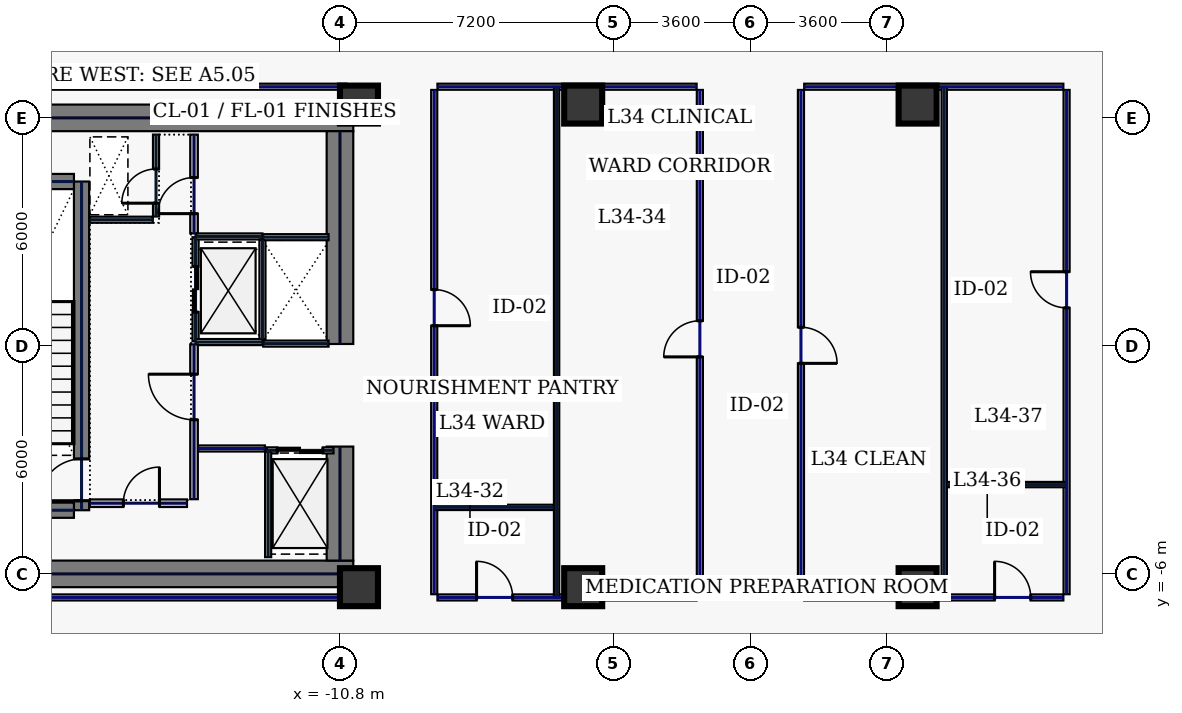
"""IFC4 building model, lengths in metres.
Left out: names, types, materials, properties, quantities, classifications, styles, units other than length and angle.
Written with IfcOpenShell. Run it as: python <this file> out.ifc"""

import sys

from ifc_helpers import new_model, si_unit, direction, frame, frame_2d, origin, origin_2d, place, context, subcontext, project, spatial, rectangle, hollow_rectangle, extrude, element, fill, save


model = new_model("IFC4")
c1 = context("Model", 3, precision=1e-05, world=origin(), true_north=direction((0.0, 1.0)))
c2 = subcontext(c1, "Body", "Model", "MODEL_VIEW")
j1 = project(units=[si_unit("LENGTHUNIT", "METRE"), si_unit("PLANEANGLEUNIT", "RADIAN")], contexts=[c1])
p1 = place(None, origin())
s1 = spatial("IfcSite", under=j1, at=p1, CompositionType="ELEMENT")
p2 = place(p1, origin())
s2 = spatial("IfcBuilding", under=s1, at=p2, CompositionType="ELEMENT")
p3 = place(p2, frame((0.0, 0.0, 152.2)))
s3 = spatial("IfcBuildingStorey", under=s2, at=p3, CompositionType="ELEMENT", Elevation=152.2)
for number, where, z_axis, x_axis in (
    (1, (-22.0, 6.0, 0.0), (0.0, 0.0, 1.0), (1.0, 0.0, 0.0)),
    (2, (-22.0, -6.0, 0.0), (0.0, 0.0, 1.0), (1.0, 0.0, 0.0)),
):
    element("IfcWall", number, at=place(p3, frame(where, z_axis=z_axis, x_axis=x_axis)), inside=s3, PredefinedType="SHEAR", context=c2, shape_type="SweptSolid", body=[
        extrude(rectangle(XDim=11.55, YDim=0.7, at=frame_2d((5.775, 0.0))), origin(), (0.0, 0.0, 1.0), 3.74),
    ])
p4 = place(p3, frame((-10.8, -5.65, 0.0), z_axis=(0.0, 0.0, 1.0), x_axis=(0.0, 1.0, 0.0)))
e3 = element("IfcWall", 3, at=p4, inside=s3, PredefinedType="SHEAR", context=c2, shape_type="SweptSolid", body=[
    extrude(rectangle(XDim=3.0, YDim=0.7, at=frame_2d((1.5, 0.0))), origin(), (0.0, 0.0, 1.0), 3.74),
])
p5 = place(p3, frame((-10.8, 0.05, 0.0), z_axis=(0.0, 0.0, 1.0), x_axis=(0.0, 1.0, 0.0)))
e4 = element("IfcWall", 4, at=p5, inside=s3, PredefinedType="SHEAR", context=c2, shape_type="SweptSolid", body=[
    extrude(rectangle(XDim=5.6, YDim=0.7, at=frame_2d((2.8, 0.0))), origin(), (0.0, 0.0, 1.0), 3.74),
])
p6 = place(p3, frame((-17.6, -4.325, 0.0), z_axis=(0.0, 0.0, 1.0), x_axis=(0.0, 1.0, 0.0)))
e5 = element("IfcWall", 5, at=p6, inside=s3, PredefinedType="SHEAR", context=c2, shape_type="SweptSolid", body=[
    extrude(rectangle(XDim=8.65, YDim=0.4, at=frame_2d((4.325, 0.0))), origin(), (0.0, 0.0, 1.0), 3.74),
])
p7 = place(p6, frame((0.25, 0.0, 0.0)))
e6 = element("IfcOpeningElement", 6, at=p7, cuts=e5, PredefinedType="OPENING", context=c2, shape_type="SweptSolid", body=[
    extrude(rectangle(XDim=1.1, YDim=2.2, at=frame_2d((0.55, 1.1))), frame((0.0, 0.21, 0.0), z_axis=(0.0, -1.0, 0.0), x_axis=(1.0, 0.0, 0.0)), (0.0, 0.0, 1.0), 0.42),
])
for number, where, z_axis, x_axis in (
    (7, (-21.2, -4.325, 0.0), (0.0, 0.0, 1.0), (1.0, 0.0, 0.0)),
    (8, (-21.2, 4.325, 0.0), (0.0, 0.0, 1.0), (1.0, 0.0, 0.0)),
):
    element("IfcWall", number, at=place(p3, frame(where, z_axis=z_axis, x_axis=x_axis)), inside=s3, PredefinedType="SHEAR", context=c2, shape_type="SweptSolid", body=[
        extrude(rectangle(XDim=3.4, YDim=0.4, at=frame_2d((1.7, 0.0))), origin(), (0.0, 0.0, 1.0), 3.74),
    ])
for number, where, z_axis, x_axis in (
    (9, (-10.3, -6.35, 0.0), (0.0, 0.0, 1.0), (1.0, 0.0, 0.0)),
    (10, (-10.3, 6.35, 0.0), (0.0, 0.0, 1.0), (1.0, 0.0, 0.0)),
    (11, (-4.4, -6.35, 0.0), (0.0, 0.0, 1.0), (1.0, 0.0, 0.0)),
    (12, (4.4, -6.35, 0.0), (0.0, 0.0, 1.0), (1.0, 0.0, 0.0)),
    (13, (-4.4, 6.35, 0.0), (0.0, 0.0, 1.0), (1.0, 0.0, 0.0)),
    (14, (4.4, 6.35, 0.0), (0.0, 0.0, 1.0), (1.0, 0.0, 0.0)),
):
    element("IfcColumn", number, at=place(p3, frame(where, z_axis=z_axis, x_axis=x_axis)), inside=s3, PredefinedType="COLUMN", context=c2, shape_type="SweptSolid", body=[
        extrude(hollow_rectangle(XDim=1.0, YDim=1.0, WallThickness=0.045, at=origin_2d()), origin(), (0.0, 0.0, 1.0), 3.74),
    ])
p8 = place(p3, frame((-14.6, 0.12, 0.0), z_axis=(0.0, 0.0, 1.0), x_axis=(0.0, 1.0, 0.0)))
e15 = element("IfcWall", 15, at=p8, inside=s3, PredefinedType="PARTITIONING", context=c2, shape_type="SweptSolid", body=[
    extrude(rectangle(XDim=2.74, YDim=0.16, at=frame_2d((1.37, 0.0))), origin(), (0.0, 0.0, 1.0), 3.74),
])
p9 = place(p8, frame((0.77, 0.0, 0.0)))
e16 = element("IfcOpeningElement", 16, at=p9, cuts=e15, PredefinedType="OPENING", context=c2, shape_type="SweptSolid", body=[
    extrude(rectangle(XDim=1.2, YDim=2.2, at=frame_2d((0.6, 1.1))), frame((0.0, 0.09, 0.0), z_axis=(0.0, -1.0, 0.0), x_axis=(1.0, 0.0, 0.0)), (0.0, 0.0, 1.0), 0.18),
])
for number, where, z_axis, x_axis in (
    (17, (-14.6, 0.1, 0.0), (0.0, 0.0, 1.0), (1.0, 0.0, 0.0)),
    (18, (-14.6, 2.88, 0.0), (0.0, 0.0, 1.0), (1.0, 0.0, 0.0)),
):
    element("IfcWall", number, at=place(p3, frame(where, z_axis=z_axis, x_axis=x_axis)), inside=s3, PredefinedType="PARTITIONING", context=c2, shape_type="SweptSolid", body=[
        extrude(rectangle(XDim=1.76, YDim=0.16, at=frame_2d((0.88, 0.0))), origin(), (0.0, 0.0, 1.0), 3.74),
    ])
p10 = place(p3, frame((-12.84, 0.18, 0.0), z_axis=(0.0, 0.0, 1.0), x_axis=(0.0, 1.0, 0.0)))
e19 = element("IfcWall", 19, at=p10, inside=s3, PredefinedType="PARTITIONING", context=c2, shape_type="SweptSolid", body=[
    extrude(rectangle(XDim=2.62, YDim=0.16, at=frame_2d((1.31, 0.0))), origin(), (0.0, 0.0, 1.0), 3.74),
])
p11 = place(p3, frame((-12.73, -2.75, 0.0), z_axis=(0.0, 0.0, 1.0), x_axis=(1.0, 0.0, 0.0)))
e20 = element("IfcWall", 20, at=p11, inside=s3, PredefinedType="PARTITIONING", context=c2, shape_type="SweptSolid", body=[
    extrude(rectangle(XDim=1.76, YDim=0.16, at=frame_2d((0.88, 0.0))), origin(), (0.0, 0.0, 1.0), 3.74),
])
p12 = place(p11, frame((0.28, 0.0, 0.0)))
e21 = element("IfcOpeningElement", 21, at=p12, cuts=e20, PredefinedType="OPENING", context=c2, shape_type="SweptSolid", body=[
    extrude(rectangle(XDim=1.2, YDim=2.2, at=frame_2d((0.6, 1.1))), frame((0.0, 0.09, 0.0), z_axis=(0.0, -1.0, 0.0), x_axis=(1.0, 0.0, 0.0)), (0.0, 0.0, 1.0), 0.18),
])
for number, where, z_axis, x_axis in (
    (22, (-12.82, 0.06, 0.0), (0.0, 0.0, 1.0), (1.0, 0.0, 0.0)),
    (23, (-12.82, 2.86, 0.0), (0.0, 0.0, 1.0), (1.0, 0.0, 0.0)),
):
    element("IfcWall", number, at=place(p3, frame(where, z_axis=z_axis, x_axis=x_axis)), inside=s3, PredefinedType="PARTITIONING", context=c2, shape_type="SweptSolid", body=[
        extrude(rectangle(XDim=1.72, YDim=0.16, at=frame_2d((0.86, 0.0))), origin(), (0.0, 0.0, 1.0), 3.74),
    ])
p13 = place(p3, frame((-15.64, 3.405, 0.0), z_axis=(0.0, 0.0, 1.0), x_axis=(0.0, 1.0, 0.0)))
e24 = element("IfcWall", 24, at=p13, inside=s3, PredefinedType="PARTITIONING", context=c2, shape_type="SweptSolid", body=[
    extrude(rectangle(XDim=2.155, YDim=0.16, at=frame_2d((1.078, 0.0))), origin(), (0.0, 0.0, 1.0), 3.74),
])
p14 = place(p13, frame((0.35, 0.0, 0.0)))
e25 = element("IfcOpeningElement", 25, at=p14, cuts=e24, PredefinedType="OPENING", context=c2, shape_type="SweptSolid", body=[
    extrude(rectangle(XDim=0.9, YDim=2.2, at=frame_2d((0.45, 1.1))), frame((0.0, 0.09, 0.0), z_axis=(0.0, -1.0, 0.0), x_axis=(1.0, 0.0, 0.0)), (0.0, 0.0, 1.0), 0.18),
])
p15 = place(p3, frame((-17.38, 3.32, 0.0), z_axis=(0.0, 0.0, 1.0), x_axis=(1.0, 0.0, 0.0)))
e26 = element("IfcWall", 26, at=p15, inside=s3, PredefinedType="PARTITIONING", context=c2, shape_type="SweptSolid", body=[
    extrude(rectangle(XDim=1.655, YDim=0.16, at=frame_2d((0.827, 0.0))), origin(), (0.0, 0.0, 1.0), 3.74),
])
p16 = place(p3, frame((-17.38, -4.14, 0.0), z_axis=(0.0, 0.0, 1.0), x_axis=(1.0, 0.0, 0.0)))
e27 = element("IfcWall", 27, at=p16, inside=s3, PredefinedType="SOLIDWALL", context=c2, shape_type="SweptSolid", body=[
    extrude(rectangle(XDim=2.555, YDim=0.2, at=frame_2d((1.277, 0.0))), origin(), (0.0, 0.0, 1.0), 3.74),
])
p17 = place(p16, frame((0.88, 0.0, 0.0)))
e28 = element("IfcOpeningElement", 28, at=p17, cuts=e27, PredefinedType="OPENING", context=c2, shape_type="SweptSolid", body=[
    extrude(rectangle(XDim=0.95, YDim=2.2, at=frame_2d((0.475, 1.1))), frame((0.0, 0.11, 0.0), z_axis=(0.0, -1.0, 0.0), x_axis=(1.0, 0.0, 0.0)), (0.0, 0.0, 1.0), 0.22),
])
p18 = place(p3, frame((-14.535, -2.7, 0.0), z_axis=(0.0, 0.0, 1.0), x_axis=(1.0, 0.0, 0.0)))
e29 = element("IfcWall", 29, at=p18, inside=s3, PredefinedType="PARTITIONING", context=c2, shape_type="SweptSolid", body=[
    extrude(rectangle(XDim=1.76, YDim=0.16, at=frame_2d((0.88, 0.0))), origin(), (0.0, 0.0, 1.0), 3.74),
])
p19 = place(p3, frame((-12.69, -5.56, 0.0), z_axis=(0.0, 0.0, 1.0), x_axis=(0.0, 1.0, 0.0)))
e30 = element("IfcWall", 30, at=p19, inside=s3, PredefinedType="PARTITIONING", context=c2, shape_type="SweptSolid", body=[
    extrude(rectangle(XDim=2.775, YDim=0.16, at=frame_2d((1.388, 0.0))), origin(), (0.0, 0.0, 1.0), 3.74),
])
p20 = place(p3, frame((-14.64, 2.96, 0.0), z_axis=(0.0, 0.0, 1.0), x_axis=(0.0, 1.0, 0.0)))
e31 = element("IfcWall", 31, at=p20, inside=s3, PredefinedType="SOLIDWALL", context=c2, shape_type="SweptSolid", body=[
    extrude(rectangle(XDim=2.6, YDim=0.2, at=frame_2d((1.3, 0.0))), origin(), (0.0, 0.0, 1.0), 3.74),
])
p21 = place(p20, frame((0.52, 0.0, 0.0)))
e32 = element("IfcOpeningElement", 32, at=p21, cuts=e31, PredefinedType="OPENING", context=c2, shape_type="SweptSolid", body=[
    extrude(rectangle(XDim=0.95, YDim=2.2, at=frame_2d((0.475, 1.1))), frame((0.0, 0.11, 0.0), z_axis=(0.0, -1.0, 0.0), x_axis=(1.0, 0.0, 0.0)), (0.0, 0.0, 1.0), 0.22),
])
p22 = place(p3, frame((-14.64, -4.035, 0.0), z_axis=(0.0, 0.0, 1.0), x_axis=(0.0, 1.0, 0.0)))
e33 = element("IfcWall", 33, at=p22, inside=s3, PredefinedType="SOLIDWALL", context=c2, shape_type="SweptSolid", body=[
    extrude(rectangle(XDim=4.075, YDim=0.2, at=frame_2d((2.038, 0.0))), origin(), (0.0, 0.0, 1.0), 3.74),
])
p23 = place(p22, frame((2.09, 0.0, 0.0)))
e34 = element("IfcOpeningElement", 34, at=p23, cuts=e33, PredefinedType="OPENING", context=c2, shape_type="SweptSolid", body=[
    extrude(rectangle(XDim=1.2, YDim=2.2, at=frame_2d((0.6, 1.1))), frame((0.0, 0.11, 0.0), z_axis=(0.0, -1.0, 0.0), x_axis=(1.0, 0.0, 0.0)), (0.0, 0.0, 1.0), 0.22),
])
for number, where, z_axis, x_axis in (
    (35, (-24.965, -6.62, 0.0), (0.0, 0.0, 1.0), (1.0, 0.0, 0.0)),
    (36, (-10.63, 6.82, 0.0), (0.0, 0.0, 1.0), (-1.0, 0.0, 0.0)),
):
    element("IfcWall", number, at=place(p3, frame(where, z_axis=z_axis, x_axis=x_axis)), inside=s3, PredefinedType="PARTITIONING", context=c2, shape_type="SweptSolid", body=[
        extrude(rectangle(XDim=14.335, YDim=0.16, at=frame_2d((7.167, 0.0))), origin(), (0.0, 0.0, 1.0), 3.74),
    ])
p24 = place(p3, frame((8.235, 6.82, 0.0), z_axis=(0.0, 0.0, 1.0), x_axis=(-1.0, 0.0, 0.0)))
e37 = element("IfcWall", 37, at=p24, inside=s3, PredefinedType="PARTITIONING", context=c2, shape_type="SweptSolid", body=[
    extrude(rectangle(XDim=6.82, YDim=0.16, at=frame_2d((3.41, 0.0))), origin(), (0.0, 0.0, 1.0), 3.74),
])
p25 = place(p3, frame((1.33, 6.735, 0.0), z_axis=(0.0, 0.0, 1.0), x_axis=(0.0, -1.0, 0.0)))
e38 = element("IfcWall", 38, at=p25, inside=s3, PredefinedType="PARTITIONING", context=c2, shape_type="SweptSolid", body=[
    extrude(rectangle(XDim=13.27, YDim=0.16, at=frame_2d((6.635, 0.0))), origin(), (0.0, 0.0, 1.0), 3.74),
])
p26 = place(p25, frame((6.245, 0.0, 0.0)))
e39 = element("IfcOpeningElement", 39, at=p26, cuts=e38, PredefinedType="OPENING", context=c2, shape_type="SweptSolid", body=[
    extrude(rectangle(XDim=0.95, YDim=2.2, at=frame_2d((0.475, 1.1))), frame((0.0, 0.09, 0.0), z_axis=(0.0, -1.0, 0.0), x_axis=(1.0, 0.0, 0.0)), (0.0, 0.0, 1.0), 0.18),
])
p27 = place(p3, frame((1.415, -6.62, 0.0), z_axis=(0.0, 0.0, 1.0), x_axis=(1.0, 0.0, 0.0)))
e40 = element("IfcWall", 40, at=p27, inside=s3, PredefinedType="PARTITIONING", context=c2, shape_type="SweptSolid", body=[
    extrude(rectangle(XDim=6.82, YDim=0.16, at=frame_2d((3.41, 0.0))), origin(), (0.0, 0.0, 1.0), 3.74),
])
p28 = place(p27, frame((5.011, 0.0, 0.0)))
e41 = element("IfcOpeningElement", 41, at=p28, cuts=e40, PredefinedType="OPENING", context=c2, shape_type="SweptSolid", body=[
    extrude(rectangle(XDim=0.95, YDim=2.2, at=frame_2d((0.475, 1.1))), frame((0.0, 0.09, 0.0), z_axis=(0.0, -1.0, 0.0), x_axis=(1.0, 0.0, 0.0)), (0.0, 0.0, 1.0), 0.18),
])
p29 = place(p3, frame((8.32, -6.535, 0.0), z_axis=(0.0, 0.0, 1.0), x_axis=(0.0, 1.0, 0.0)))
e42 = element("IfcWall", 42, at=p29, inside=s3, PredefinedType="PARTITIONING", context=c2, shape_type="SweptSolid", body=[
    extrude(rectangle(XDim=13.27, YDim=0.16, at=frame_2d((6.635, 0.0))), origin(), (0.0, 0.0, 1.0), 3.74),
])
p30 = place(p29, frame((7.536, 0.0, 0.0)))
e43 = element("IfcOpeningElement", 43, at=p30, cuts=e42, PredefinedType="OPENING", context=c2, shape_type="SweptSolid", body=[
    extrude(rectangle(XDim=0.95, YDim=2.2, at=frame_2d((0.475, 1.1))), frame((0.0, 0.09, 0.0), z_axis=(0.0, -1.0, 0.0), x_axis=(1.0, 0.0, 0.0)), (0.0, 0.0, 1.0), 0.18),
])
p31 = place(p3, frame((-1.33, -6.535, 0.0), z_axis=(0.0, 0.0, 1.0), x_axis=(0.0, 1.0, 0.0)))
e44 = element("IfcWall", 44, at=p31, inside=s3, PredefinedType="PARTITIONING", context=c2, shape_type="SweptSolid", body=[
    extrude(rectangle(XDim=13.27, YDim=0.16, at=frame_2d((6.635, 0.0))), origin(), (0.0, 0.0, 1.0), 3.74),
])
p32 = place(p31, frame((6.245, 0.0, 0.0)))
e45 = element("IfcOpeningElement", 45, at=p32, cuts=e44, PredefinedType="OPENING", context=c2, shape_type="SweptSolid", body=[
    extrude(rectangle(XDim=0.95, YDim=2.2, at=frame_2d((0.475, 1.1))), frame((0.0, 0.09, 0.0), z_axis=(0.0, -1.0, 0.0), x_axis=(1.0, 0.0, 0.0)), (0.0, 0.0, 1.0), 0.18),
])
p33 = place(p3, frame((-1.415, 6.82, 0.0), z_axis=(0.0, 0.0, 1.0), x_axis=(-1.0, 0.0, 0.0)))
e46 = element("IfcWall", 46, at=p33, inside=s3, PredefinedType="PARTITIONING", context=c2, shape_type="SweptSolid", body=[
    extrude(rectangle(XDim=6.82, YDim=0.16, at=frame_2d((3.41, 0.0))), origin(), (0.0, 0.0, 1.0), 3.74),
])
p34 = place(p3, frame((-8.32, 6.735, 0.0), z_axis=(0.0, 0.0, 1.0), x_axis=(0.0, -1.0, 0.0)))
e47 = element("IfcWall", 47, at=p34, inside=s3, PredefinedType="PARTITIONING", context=c2, shape_type="SweptSolid", body=[
    extrude(rectangle(XDim=13.27, YDim=0.16, at=frame_2d((6.635, 0.0))), origin(), (0.0, 0.0, 1.0), 3.74),
])
p35 = place(p34, frame((5.254, 0.0, 0.0)))
e48 = element("IfcOpeningElement", 48, at=p35, cuts=e47, PredefinedType="OPENING", context=c2, shape_type="SweptSolid", body=[
    extrude(rectangle(XDim=0.95, YDim=2.2, at=frame_2d((0.475, 1.1))), frame((0.0, 0.09, 0.0), z_axis=(0.0, -1.0, 0.0), x_axis=(1.0, 0.0, 0.0)), (0.0, 0.0, 1.0), 0.18),
])
p36 = place(p3, frame((-8.235, -6.62, 0.0), z_axis=(0.0, 0.0, 1.0), x_axis=(1.0, 0.0, 0.0)))
e49 = element("IfcWall", 49, at=p36, inside=s3, PredefinedType="PARTITIONING", context=c2, shape_type="SweptSolid", body=[
    extrude(rectangle(XDim=6.82, YDim=0.16, at=frame_2d((3.41, 0.0))), origin(), (0.0, 0.0, 1.0), 3.74),
])
p37 = place(p36, frame((1.029, 0.0, 0.0)))
e50 = element("IfcOpeningElement", 50, at=p37, cuts=e49, PredefinedType="OPENING", context=c2, shape_type="SweptSolid", body=[
    extrude(rectangle(XDim=0.95, YDim=2.2, at=frame_2d((0.475, 1.1))), frame((0.0, 0.09, 0.0), z_axis=(0.0, -1.0, 0.0), x_axis=(1.0, 0.0, 0.0)), (0.0, 0.0, 1.0), 0.18),
])
for number, where, z_axis, x_axis in (
    (51, (-5.1, -6.615, 0.0), (0.0, 0.0, 1.0), (0.0, 1.0, 0.0)),
    (52, (5.1, -6.615, 0.0), (0.0, 0.0, 1.0), (0.0, 1.0, 0.0)),
):
    element("IfcWall", number, at=place(p3, frame(where, z_axis=z_axis, x_axis=x_axis)), inside=s3, PredefinedType="PARTITIONING", context=c2, shape_type="SweptSolid", body=[
        extrude(rectangle(XDim=13.43, YDim=0.14, at=frame_2d((6.715, 0.0))), origin(), (0.0, 0.0, 1.0), 3.74),
    ])
for number, where, z_axis, x_axis in (
    (53, (-8.315, -4.25, 0.0), (0.0, 0.0, 1.0), (1.0, 0.0, 0.0)),
    (54, (5.175, -3.65, 0.0), (0.0, 0.0, 1.0), (1.0, 0.0, 0.0)),
):
    element("IfcWall", number, at=place(p3, frame(where, z_axis=z_axis, x_axis=x_axis)), inside=s3, PredefinedType="PARTITIONING", context=c2, shape_type="SweptSolid", body=[
        extrude(rectangle(XDim=3.14, YDim=0.14, at=frame_2d((1.57, 0.0))), origin(), (0.0, 0.0, 1.0), 3.74),
    ])
p38 = place(p7, origin())
e55 = element("IfcDoor", 55, at=p38, inside=s3, OperationType="SINGLE_SWING_LEFT", PredefinedType="DOOR", context=c2, shape_type="SweptSolid", body=[
    extrude(rectangle(XDim=1.1, YDim=2.2, at=frame_2d((0.55, 1.1))), frame((0.0, 0.025, 0.0), z_axis=(0.0, -1.0, 0.0), x_axis=(1.0, 0.0, 0.0)), (0.0, 0.0, 1.0), 0.05),
])
fill(e6, e55)
p39 = place(p9, origin())
e56 = element("IfcDoor", 56, at=p39, inside=s3, OperationType="SLIDING_TO_LEFT", PredefinedType="DOOR", context=c2, shape_type="SweptSolid", body=[
    extrude(rectangle(XDim=1.2, YDim=2.2, at=frame_2d((0.6, 1.1))), frame((0.0, 0.025, 0.0), z_axis=(0.0, -1.0, 0.0), x_axis=(1.0, 0.0, 0.0)), (0.0, 0.0, 1.0), 0.05),
])
fill(e16, e56)
p40 = place(p12, origin())
e57 = element("IfcDoor", 57, at=p40, inside=s3, OperationType="SLIDING_TO_LEFT", PredefinedType="DOOR", context=c2, shape_type="SweptSolid", body=[
    extrude(rectangle(XDim=1.2, YDim=2.2, at=frame_2d((0.6, 1.1))), frame((0.0, 0.025, 0.0), z_axis=(0.0, -1.0, 0.0), x_axis=(1.0, 0.0, 0.0)), (0.0, 0.0, 1.0), 0.05),
])
fill(e21, e57)
p41 = place(p14, origin())
e58 = element("IfcDoor", 58, at=p41, inside=s3, OperationType="SINGLE_SWING_LEFT", PredefinedType="DOOR", context=c2, shape_type="SweptSolid", body=[
    extrude(rectangle(XDim=0.9, YDim=2.2, at=frame_2d((0.45, 1.1))), frame((0.0, 0.025, 0.0), z_axis=(0.0, -1.0, 0.0), x_axis=(1.0, 0.0, 0.0)), (0.0, 0.0, 1.0), 0.05),
])
fill(e25, e58)
p42 = place(p17, origin())
e59 = element("IfcDoor", 59, at=p42, inside=s3, OperationType="SINGLE_SWING_RIGHT", PredefinedType="DOOR", context=c2, shape_type="SweptSolid", body=[
    extrude(rectangle(XDim=0.95, YDim=2.2, at=frame_2d((0.475, 1.1))), frame((0.0, 0.025, 0.0), z_axis=(0.0, -1.0, 0.0), x_axis=(1.0, 0.0, 0.0)), (0.0, 0.0, 1.0), 0.05),
])
fill(e28, e59)
p43 = place(p21, origin())
e60 = element("IfcDoor", 60, at=p43, inside=s3, OperationType="SINGLE_SWING_LEFT", PredefinedType="DOOR", context=c2, shape_type="SweptSolid", body=[
    extrude(rectangle(XDim=0.95, YDim=2.2, at=frame_2d((0.475, 1.1))), frame((0.0, 0.025, 0.0), z_axis=(0.0, -1.0, 0.0), x_axis=(1.0, 0.0, 0.0)), (0.0, 0.0, 1.0), 0.05),
])
fill(e32, e60)
p44 = place(p23, origin())
e61 = element("IfcDoor", 61, at=p44, inside=s3, OperationType="SINGLE_SWING_RIGHT", PredefinedType="DOOR", context=c2, shape_type="SweptSolid", body=[
    extrude(rectangle(XDim=1.2, YDim=2.2, at=frame_2d((0.6, 1.1))), frame((0.0, 0.025, 0.0), z_axis=(0.0, -1.0, 0.0), x_axis=(1.0, 0.0, 0.0)), (0.0, 0.0, 1.0), 0.05),
])
fill(e34, e61)
p45 = place(p37, origin())
e62 = element("IfcDoor", 62, at=p45, inside=s3, OperationType="SINGLE_SWING_LEFT", PredefinedType="DOOR", context=c2, shape_type="SweptSolid", body=[
    extrude(rectangle(XDim=0.95, YDim=2.2, at=frame_2d((0.475, 1.1))), frame((0.0, 0.025, 0.0), z_axis=(0.0, -1.0, 0.0), x_axis=(1.0, 0.0, 0.0)), (0.0, 0.0, 1.0), 0.05),
])
fill(e50, e62)
p46 = place(p35, origin())
e63 = element("IfcDoor", 63, at=p46, inside=s3, OperationType="SINGLE_SWING_RIGHT", PredefinedType="DOOR", context=c2, shape_type="SweptSolid", body=[
    extrude(rectangle(XDim=0.95, YDim=2.2, at=frame_2d((0.475, 1.1))), frame((0.0, 0.025, 0.0), z_axis=(0.0, -1.0, 0.0), x_axis=(1.0, 0.0, 0.0)), (0.0, 0.0, 1.0), 0.05),
])
fill(e48, e63)
p47 = place(p32, origin())
e64 = element("IfcDoor", 64, at=p47, inside=s3, OperationType="SINGLE_SWING_LEFT", PredefinedType="DOOR", context=c2, shape_type="SweptSolid", body=[
    extrude(rectangle(XDim=0.95, YDim=2.2, at=frame_2d((0.475, 1.1))), frame((0.0, 0.025, 0.0), z_axis=(0.0, -1.0, 0.0), x_axis=(1.0, 0.0, 0.0)), (0.0, 0.0, 1.0), 0.05),
])
fill(e45, e64)
p48 = place(p26, origin())
e65 = element("IfcDoor", 65, at=p48, inside=s3, OperationType="SINGLE_SWING_RIGHT", PredefinedType="DOOR", context=c2, shape_type="SweptSolid", body=[
    extrude(rectangle(XDim=0.95, YDim=2.2, at=frame_2d((0.475, 1.1))), frame((0.0, 0.025, 0.0), z_axis=(0.0, -1.0, 0.0), x_axis=(1.0, 0.0, 0.0)), (0.0, 0.0, 1.0), 0.05),
])
fill(e39, e65)
p49 = place(p28, origin())
e66 = element("IfcDoor", 66, at=p49, inside=s3, OperationType="SINGLE_SWING_LEFT", PredefinedType="DOOR", context=c2, shape_type="SweptSolid", body=[
    extrude(rectangle(XDim=0.95, YDim=2.2, at=frame_2d((0.475, 1.1))), frame((0.0, 0.025, 0.0), z_axis=(0.0, -1.0, 0.0), x_axis=(1.0, 0.0, 0.0)), (0.0, 0.0, 1.0), 0.05),
])
fill(e41, e66)
p50 = place(p30, origin())
e67 = element("IfcDoor", 67, at=p50, inside=s3, OperationType="SINGLE_SWING_RIGHT", PredefinedType="DOOR", context=c2, shape_type="SweptSolid", body=[
    extrude(rectangle(XDim=0.95, YDim=2.2, at=frame_2d((0.475, 1.1))), frame((0.0, 0.025, 0.0), z_axis=(0.0, -1.0, 0.0), x_axis=(1.0, 0.0, 0.0)), (0.0, 0.0, 1.0), 0.05),
])
fill(e43, e67)
save(model, sys.argv[1])
